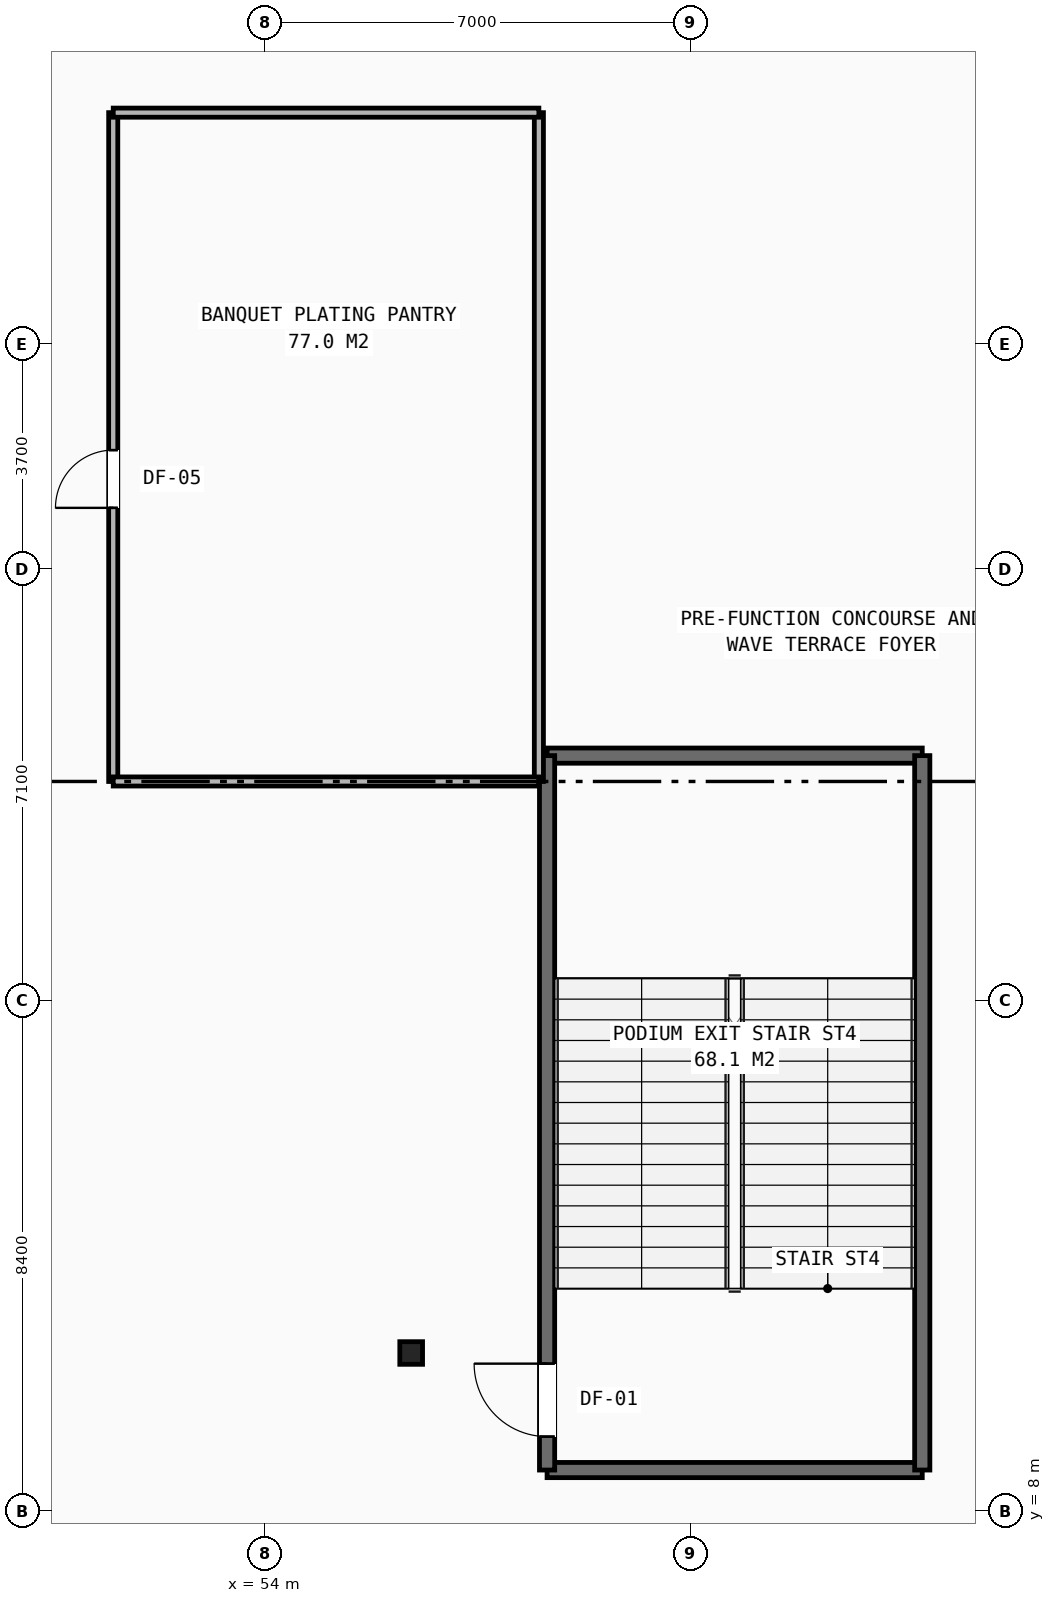
"""IFC4 building model, lengths in metres.
Left out: names, types, materials, properties, quantities, classifications, styles, units other than length and angle.
Written with IfcOpenShell. Run it as: python <this file> out.ifc"""

import sys

from ifc_helpers import new_model, si_unit, direction, frame, frame_2d, origin, origin_2d, place, context, subcontext, project, spatial, rectangle, i_section, extrude, element, fill, save


model = new_model("IFC4")
c1 = context("Model", 3, precision=1e-05, world=origin(), true_north=direction((0.0, 1.0)))
c2 = subcontext(c1, "Body", "Model", "MODEL_VIEW")
j1 = project(units=[si_unit("LENGTHUNIT", "METRE"), si_unit("PLANEANGLEUNIT", "RADIAN")], contexts=[c1])
p1 = place(None, origin())
s1 = spatial("IfcSite", under=j1, at=p1, CompositionType="ELEMENT")
p2 = place(p1, origin())
s2 = spatial("IfcBuilding", under=s1, at=p2, CompositionType="ELEMENT")
p3 = place(p2, frame((0.0, 0.0, 16.5)))
s3 = spatial("IfcBuildingStorey", under=s2, at=p3, CompositionType="ELEMENT", Elevation=16.5)
p4 = place(p3, frame((56.4, 10.6, 0.0), z_axis=(0.0, 0.0, 1.0), x_axis=(1.0, 0.0, 0.0)))
e1 = element("IfcColumn", 1, at=p4, inside=s3, PredefinedType="COLUMN", context=c2, shape_type="SweptSolid", body=[
    extrude(i_section(OverallWidth=0.374, OverallDepth=0.372, WebThickness=0.016, FlangeThickness=0.026, at=origin_2d()), origin(), (0.0, 0.0, 1.0), 5.5),
])
for number, where, z_axis, x_axis in (
    (2, (58.635, 20.425, 0.0), (0.0, 0.0, 1.0), (1.0, 0.0, 0.0)),
    (3, (58.635, 8.675, 0.0), (0.0, 0.0, 1.0), (1.0, 0.0, 0.0)),
):
    element("IfcWall", number, at=place(p3, frame(where, z_axis=z_axis, x_axis=x_axis)), inside=s3, PredefinedType="SHEAR", context=c2, shape_type="SweptSolid", body=[
        extrude(rectangle(XDim=6.17, YDim=0.25, at=frame_2d((3.085, 0.0))), origin(), (0.0, 0.0, 1.0), 5.18),
    ])
p5 = place(p3, frame((58.635, 8.675, 0.0), z_axis=(0.0, 0.0, 1.0), x_axis=(0.0, 1.0, 0.0)))
e4 = element("IfcWall", 4, at=p5, inside=s3, PredefinedType="SHEAR", context=c2, shape_type="SweptSolid", body=[
    extrude(rectangle(XDim=11.75, YDim=0.25, at=frame_2d((5.875, 0.0))), origin(), (0.0, 0.0, 1.0), 5.18),
])
p6 = place(p5, frame((0.55, 0.0, 0.0)))
e5 = element("IfcOpeningElement", 5, at=p6, cuts=e4, PredefinedType="OPENING", context=c2, shape_type="SweptSolid", body=[
    extrude(rectangle(XDim=1.2, YDim=2.15, at=frame_2d((0.6, 1.075))), frame((0.0, 0.135, 0.0), z_axis=(0.0, -1.0, 0.0), x_axis=(1.0, 0.0, 0.0)), (0.0, 0.0, 1.0), 0.27),
])
p7 = place(p3, frame((64.805, 8.675, 0.0), z_axis=(0.0, 0.0, 1.0), x_axis=(0.0, 1.0, 0.0)))
e6 = element("IfcWall", 6, at=p7, inside=s3, PredefinedType="SHEAR", context=c2, shape_type="SweptSolid", body=[
    extrude(rectangle(XDim=11.75, YDim=0.25, at=frame_2d((5.875, 0.0))), origin(), (0.0, 0.0, 1.0), 5.18),
])
p8 = place(p3, frame((51.5, 20.0, 0.0), z_axis=(0.0, 0.0, 1.0), x_axis=(0.0, 1.0, 0.0)))
e7 = element("IfcWall", 7, at=p8, inside=s3, PredefinedType="PARTITIONING", context=c2, shape_type="SweptSolid", body=[
    extrude(rectangle(XDim=11.0, YDim=0.15, at=frame_2d((5.5, 0.0))), origin(), (0.0, 0.0, 1.0), 5.18),
])
p9 = place(p8, frame((4.5, 0.0, 0.0)))
e8 = element("IfcOpeningElement", 8, at=p9, cuts=e7, PredefinedType="OPENING", context=c2, shape_type="SweptSolid", body=[
    extrude(rectangle(XDim=0.95, YDim=2.1, at=frame_2d((0.475, 1.05))), frame((0.0, 0.085, 0.0), z_axis=(0.0, -1.0, 0.0), x_axis=(1.0, 0.0, 0.0)), (0.0, 0.0, 1.0), 0.17),
])
p10 = place(p3, frame((58.5, 20.0, 0.0), z_axis=(0.0, 0.0, 1.0), x_axis=(0.0, 1.0, 0.0)))
e9 = element("IfcWall", 9, at=p10, inside=s3, PredefinedType="PARTITIONING", context=c2, shape_type="SweptSolid", body=[
    extrude(rectangle(XDim=11.0, YDim=0.15, at=frame_2d((5.5, 0.0))), origin(), (0.0, 0.0, 1.0), 5.18),
])
for number, where, z_axis, x_axis in (
    (10, (51.5, 20.0, 0.0), (0.0, 0.0, 1.0), (1.0, 0.0, 0.0)),
    (11, (51.5, 31.0, 0.0), (0.0, 0.0, 1.0), (1.0, 0.0, 0.0)),
):
    element("IfcWall", number, at=place(p3, frame(where, z_axis=z_axis, x_axis=x_axis)), inside=s3, PredefinedType="PARTITIONING", context=c2, shape_type="SweptSolid", body=[
        extrude(rectangle(XDim=7.0, YDim=0.15, at=frame_2d((3.5, 0.0))), origin(), (0.0, 0.0, 1.0), 5.18),
    ])
p11 = place(p9, origin())
e12 = element("IfcDoor", 12, at=p11, inside=s3, OperationType="SINGLE_SWING_LEFT", PredefinedType="DOOR", context=c2, shape_type="SweptSolid", body=[
    extrude(rectangle(XDim=0.95, YDim=2.1, at=frame_2d((0.475, 1.05))), frame((0.0, 0.025, 0.0), z_axis=(0.0, -1.0, 0.0), x_axis=(1.0, 0.0, 0.0)), (0.0, 0.0, 1.0), 0.05),
])
fill(e8, e12)
p12 = place(p6, origin())
e13 = element("IfcDoor", 13, at=p12, inside=s3, OperationType="SINGLE_SWING_RIGHT", PredefinedType="DOOR", context=c2, shape_type="SweptSolid", body=[
    extrude(rectangle(XDim=1.2, YDim=2.15, at=frame_2d((0.6, 1.075))), frame((0.0, 0.025, 0.0), z_axis=(0.0, -1.0, 0.0), x_axis=(1.0, 0.0, 0.0)), (0.0, 0.0, 1.0), 0.05),
])
fill(e5, e13)
save(model, sys.argv[1])
